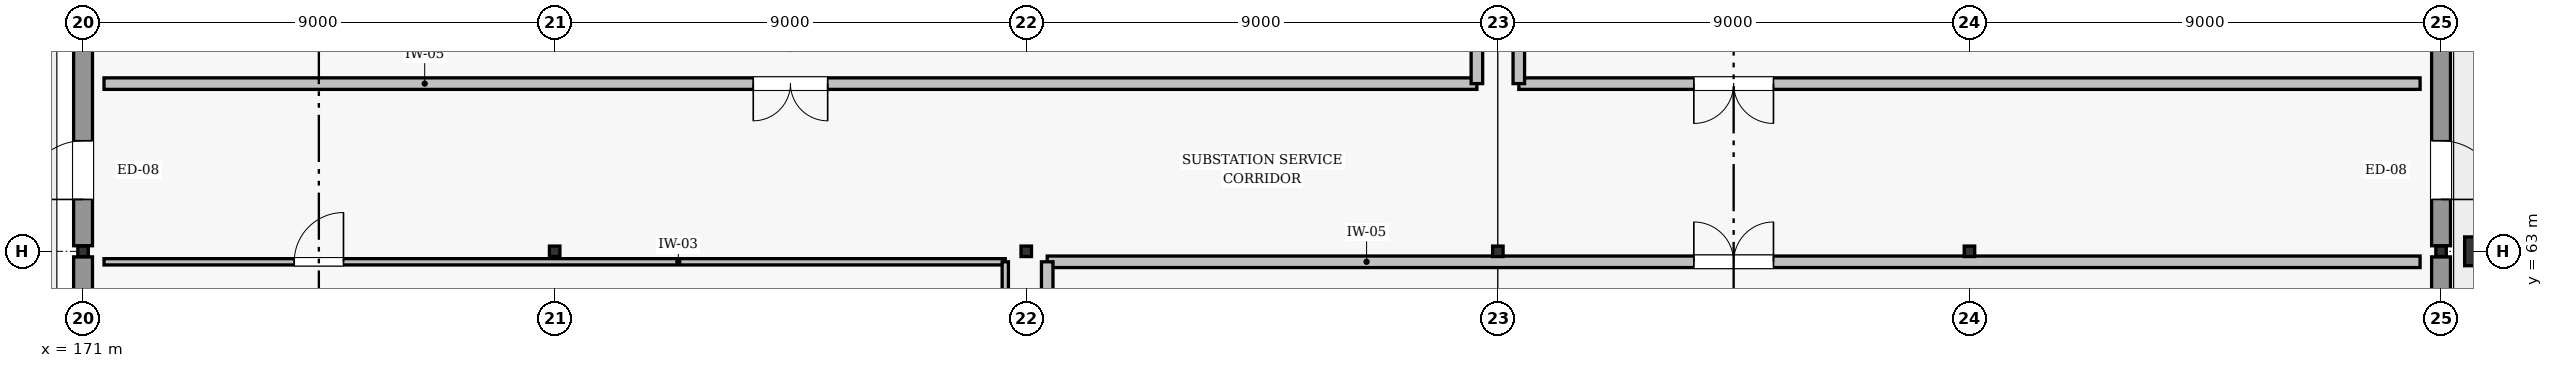
"""IFC4 building model, lengths in metres.
Left out: names, types, materials, properties, quantities, classifications, styles, units other than length and angle.
Written with IfcOpenShell. Run it as: python <this file> out.ifc"""

import sys

from ifc_helpers import new_model, si_unit, direction, frame, frame_2d, origin, origin_2d, place, context, subcontext, project, spatial, rectangle, hollow_rectangle, extrude, element, fill, save


model = new_model("IFC4")
c1 = context("Model", 3, precision=1e-05, world=origin(), true_north=direction((0.0, 1.0)))
c2 = subcontext(c1, "Body", "Model", "MODEL_VIEW")
j1 = project(units=[si_unit("LENGTHUNIT", "METRE"), si_unit("PLANEANGLEUNIT", "RADIAN")], contexts=[c1])
p1 = place(None, origin())
s1 = spatial("IfcSite", under=j1, at=p1, CompositionType="ELEMENT")
p2 = place(p1, origin())
s2 = spatial("IfcBuilding", under=s1, at=p2, CompositionType="ELEMENT")
p3 = place(p2, origin())
s3 = spatial("IfcBuildingStorey", under=s2, at=p3, CompositionType="ELEMENT", Elevation=0.0)
for number, where, z_axis, x_axis in (
    (1, (171.0, 63.0, 0.0), (0.0, 0.0, 1.0), (1.0, 0.0, 0.0)),
    (2, (180.0, 63.0, 0.0), (0.0, 0.0, 1.0), (1.0, 0.0, 0.0)),
    (3, (189.0, 63.0, 0.0), (0.0, 0.0, 1.0), (1.0, 0.0, 0.0)),
    (4, (198.0, 63.0, 0.0), (0.0, 0.0, 1.0), (1.0, 0.0, 0.0)),
    (5, (207.0, 63.0, 0.0), (0.0, 0.0, 1.0), (1.0, 0.0, 0.0)),
    (6, (216.0, 63.0, 0.0), (0.0, 0.0, 1.0), (1.0, 0.0, 0.0)),
):
    element("IfcColumn", number, at=place(p3, frame(where, z_axis=z_axis, x_axis=x_axis)), inside=s3, PredefinedType="COLUMN", context=c2, shape_type="SweptSolid", body=[
        extrude(hollow_rectangle(XDim=0.2, YDim=0.2, WallThickness=0.008, InnerFilletRadius=0.008, OuterFilletRadius=0.016, at=origin_2d()), origin(), (0.0, 0.0, 1.0), 4.8),
    ])
p4 = place(p3, frame((216.85, 63.0, 0.0), z_axis=(0.0, 0.0, 1.0), x_axis=(0.0, 1.0, 0.0)))
e7 = element("IfcColumn", 7, at=p4, inside=s3, PredefinedType="PILASTER", context=c2, shape_type="SweptSolid", body=[
    extrude(rectangle(XDim=0.55, YDim=0.8, at=origin_2d()), origin(), (0.0, 0.0, 1.0), 4.8),
])
p5 = place(p3, frame((171.0, 54.131, 0.0), z_axis=(0.0, 0.0, 1.0), x_axis=(0.0, 1.0, 0.0)))
e8 = element("IfcWall", 8, at=p5, inside=s3, PredefinedType="SOLIDWALL", context=c2, shape_type="SweptSolid", body=[
    extrude(rectangle(XDim=8.763, YDim=0.36, at=frame_2d((4.381, 0.0))), origin(), (0.0, 0.0, 1.0), 4.142),
])
p6 = place(p5, frame((1.801, 0.0, 0.85)))
e9 = element("IfcOpeningElement", 9, at=p6, cuts=e8, PredefinedType="OPENING", context=c2, shape_type="SweptSolid", body=[
    extrude(rectangle(XDim=1.68, YDim=1.66, at=frame_2d((0.84, 0.83))), frame((0.0, 0.19, 0.0), z_axis=(0.0, -1.0, 0.0), x_axis=(1.0, 0.0, 0.0)), (0.0, 0.0, 1.0), 0.38),
])
p7 = place(p5, frame((5.282, 0.0, 0.85)))
e10 = element("IfcOpeningElement", 10, at=p7, cuts=e8, PredefinedType="OPENING", context=c2, shape_type="SweptSolid", body=[
    extrude(rectangle(XDim=1.68, YDim=1.66, at=frame_2d((0.84, 0.83))), frame((0.0, 0.19, 0.0), z_axis=(0.0, -1.0, 0.0), x_axis=(1.0, 0.0, 0.0)), (0.0, 0.0, 1.0), 0.38),
])
p8 = place(p3, frame((171.0, 63.106, 0.0), z_axis=(0.0, 0.0, 1.0), x_axis=(0.0, 1.0, 0.0)))
e11 = element("IfcWall", 11, at=p8, inside=s3, PredefinedType="SOLIDWALL", context=c2, shape_type="SweptSolid", body=[
    extrude(rectangle(XDim=8.798, YDim=0.36, at=frame_2d((4.399, 0.0))), origin(), (0.0, 0.0, 1.0), 4.142),
])
p9 = place(p8, frame((0.884, 0.0, 0.0)))
e12 = element("IfcOpeningElement", 12, at=p9, cuts=e11, PredefinedType="OPENING", context=c2, shape_type="SweptSolid", body=[
    extrude(rectangle(XDim=1.12, YDim=2.14, at=frame_2d((0.56, 1.07))), frame((0.0, 0.19, 0.0), z_axis=(0.0, -1.0, 0.0), x_axis=(1.0, 0.0, 0.0)), (0.0, 0.0, 1.0), 0.38),
])
p10 = place(p3, frame((216.0, 54.131, 0.0), z_axis=(0.0, 0.0, 1.0), x_axis=(0.0, 1.0, 0.0)))
e13 = element("IfcWall", 13, at=p10, inside=s3, PredefinedType="SOLIDWALL", context=c2, shape_type="SweptSolid", body=[
    extrude(rectangle(XDim=8.763, YDim=0.36, at=frame_2d((4.381, 0.0))), origin(), (0.0, 0.0, 1.0), 4.142),
])
p11 = place(p10, frame((2.294, 0.0, 0.85)))
e14 = element("IfcOpeningElement", 14, at=p11, cuts=e13, PredefinedType="OPENING", context=c2, shape_type="SweptSolid", body=[
    extrude(rectangle(XDim=0.94, YDim=1.28, at=frame_2d((0.47, 0.64))), frame((0.0, 0.19, 0.0), z_axis=(0.0, -1.0, 0.0), x_axis=(1.0, 0.0, 0.0)), (0.0, 0.0, 1.0), 0.38),
])
p12 = place(p10, frame((5.529, 0.0, 0.85)))
e15 = element("IfcOpeningElement", 15, at=p12, cuts=e13, PredefinedType="OPENING", context=c2, shape_type="SweptSolid", body=[
    extrude(rectangle(XDim=0.94, YDim=1.28, at=frame_2d((0.47, 0.64))), frame((0.0, 0.19, 0.0), z_axis=(0.0, -1.0, 0.0), x_axis=(1.0, 0.0, 0.0)), (0.0, 0.0, 1.0), 0.38),
])
p13 = place(p3, frame((216.0, 63.106, 0.0), z_axis=(0.0, 0.0, 1.0), x_axis=(0.0, 1.0, 0.0)))
e16 = element("IfcWall", 16, at=p13, inside=s3, PredefinedType="SOLIDWALL", context=c2, shape_type="SweptSolid", body=[
    extrude(rectangle(XDim=8.798, YDim=0.36, at=frame_2d((4.399, 0.0))), origin(), (0.0, 0.0, 1.0), 4.142),
])
p14 = place(p13, frame((0.884, 0.0, 0.0)))
e17 = element("IfcOpeningElement", 17, at=p14, cuts=e16, PredefinedType="OPENING", context=c2, shape_type="SweptSolid", body=[
    extrude(rectangle(XDim=1.12, YDim=2.14, at=frame_2d((0.56, 1.07))), frame((0.0, 0.19, 0.0), z_axis=(0.0, -1.0, 0.0), x_axis=(1.0, 0.0, 0.0)), (0.0, 0.0, 1.0), 0.38),
])
p15 = place(p3, frame((171.4, 62.8, 0.0), z_axis=(0.0, 0.0, 1.0), x_axis=(1.0, 0.0, 0.0)))
e18 = element("IfcWall", 18, at=p15, inside=s3, PredefinedType="PARTITIONING", context=c2, shape_type="SweptSolid", body=[
    extrude(rectangle(XDim=17.2, YDim=0.12, at=frame_2d((8.6, 0.0))), origin(), (0.0, 0.0, 1.0), 4.145),
])
p16 = place(p15, frame((3.63, 0.0, 0.0)))
e19 = element("IfcOpeningElement", 19, at=p16, cuts=e18, PredefinedType="OPENING", context=c2, shape_type="SweptSolid", body=[
    extrude(rectangle(XDim=0.94, YDim=2.06, at=frame_2d((0.47, 1.03))), frame((0.0, 0.07, 0.0), z_axis=(0.0, -1.0, 0.0), x_axis=(1.0, 0.0, 0.0)), (0.0, 0.0, 1.0), 0.14),
])
p17 = place(p3, frame((188.6, 54.4, 0.0), z_axis=(0.0, 0.0, 1.0), x_axis=(0.0, 1.0, 0.0)))
e20 = element("IfcWall", 20, at=p17, inside=s3, PredefinedType="PARTITIONING", context=c2, shape_type="SweptSolid", body=[
    extrude(rectangle(XDim=8.4, YDim=0.12, at=frame_2d((4.2, 0.0))), origin(), (0.0, 0.0, 1.0), 4.55),
])
p18 = place(p3, frame((189.4, 62.8, 0.0), z_axis=(0.0, 0.0, 1.0), x_axis=(1.0, 0.0, 0.0)))
e21 = element("IfcWall", 21, at=p18, inside=s3, PredefinedType="SOLIDWALL", context=c2, shape_type="SweptSolid", body=[
    extrude(rectangle(XDim=26.2, YDim=0.22, at=frame_2d((13.1, 0.0))), origin(), (0.0, 0.0, 1.0), 4.145),
])
p19 = place(p18, frame((12.34, 0.0, 0.0)))
e22 = element("IfcOpeningElement", 22, at=p19, cuts=e21, PredefinedType="OPENING", context=c2, shape_type="SweptSolid", body=[
    extrude(rectangle(XDim=1.52, YDim=2.16, at=frame_2d((0.76, 1.08))), frame((0.0, 0.12, 0.0), z_axis=(0.0, -1.0, 0.0), x_axis=(1.0, 0.0, 0.0)), (0.0, 0.0, 1.0), 0.24),
])
p20 = place(p3, frame((189.4, 54.4, 0.0), z_axis=(0.0, 0.0, 1.0), x_axis=(0.0, 1.0, 0.0)))
e23 = element("IfcWall", 23, at=p20, inside=s3, PredefinedType="SOLIDWALL", context=c2, shape_type="SweptSolid", body=[
    extrude(rectangle(XDim=8.4, YDim=0.22, at=frame_2d((4.2, 0.0))), origin(), (0.0, 0.0, 1.0), 4.55),
])
p21 = place(p3, frame((171.4, 66.2, 0.0), z_axis=(0.0, 0.0, 1.0), x_axis=(1.0, 0.0, 0.0)))
e24 = element("IfcWall", 24, at=p21, inside=s3, PredefinedType="SOLIDWALL", context=c2, shape_type="SweptSolid", body=[
    extrude(rectangle(XDim=26.2, YDim=0.22, at=frame_2d((13.1, 0.0))), origin(), (0.0, 0.0, 1.0), 4.145),
])
p22 = place(p21, frame((12.39, 0.0, 0.0)))
e25 = element("IfcOpeningElement", 25, at=p22, cuts=e24, PredefinedType="OPENING", context=c2, shape_type="SweptSolid", body=[
    extrude(rectangle(XDim=1.42, YDim=2.12, at=frame_2d((0.71, 1.06))), frame((0.0, 0.12, 0.0), z_axis=(0.0, -1.0, 0.0), x_axis=(1.0, 0.0, 0.0)), (0.0, 0.0, 1.0), 0.24),
])
p23 = place(p3, frame((197.6, 66.2, 0.0), z_axis=(0.0, 0.0, 1.0), x_axis=(0.0, 1.0, 0.0)))
e26 = element("IfcWall", 26, at=p23, inside=s3, PredefinedType="SOLIDWALL", context=c2, shape_type="SweptSolid", body=[
    extrude(rectangle(XDim=14.4, YDim=0.22, at=frame_2d((7.2, 0.0))), origin(), (0.0, 0.0, 1.0), 4.55),
])
p24 = place(p3, frame((198.4, 66.2, 0.0), z_axis=(0.0, 0.0, 1.0), x_axis=(1.0, 0.0, 0.0)))
e27 = element("IfcWall", 27, at=p24, inside=s3, PredefinedType="SOLIDWALL", context=c2, shape_type="SweptSolid", body=[
    extrude(rectangle(XDim=17.2, YDim=0.22, at=frame_2d((8.6, 0.0))), origin(), (0.0, 0.0, 1.0), 4.145),
])
p25 = place(p24, frame((3.34, 0.0, 0.0)))
e28 = element("IfcOpeningElement", 28, at=p25, cuts=e27, PredefinedType="OPENING", context=c2, shape_type="SweptSolid", body=[
    extrude(rectangle(XDim=1.52, YDim=2.16, at=frame_2d((0.76, 1.08))), frame((0.0, 0.12, 0.0), z_axis=(0.0, -1.0, 0.0), x_axis=(1.0, 0.0, 0.0)), (0.0, 0.0, 1.0), 0.24),
])
p26 = place(p3, frame((198.4, 66.2, 0.0), z_axis=(0.0, 0.0, 1.0), x_axis=(0.0, 1.0, 0.0)))
e29 = element("IfcWall", 29, at=p26, inside=s3, PredefinedType="SOLIDWALL", context=c2, shape_type="SweptSolid", body=[
    extrude(rectangle(XDim=14.4, YDim=0.22, at=frame_2d((7.2, 0.0))), origin(), (0.0, 0.0, 1.0), 4.55),
])
p27 = place(p9, origin())
e30 = element("IfcDoor", 30, at=p27, inside=s3, OperationType="SINGLE_SWING_LEFT", PredefinedType="DOOR", context=c2, shape_type="SweptSolid", body=[
    extrude(rectangle(XDim=1.12, YDim=2.14, at=frame_2d((0.56, 1.07))), frame((0.0, 0.025, 0.0), z_axis=(0.0, -1.0, 0.0), x_axis=(1.0, 0.0, 0.0)), (0.0, 0.0, 1.0), 0.05),
])
fill(e12, e30)
p28 = place(p14, frame((1.12, 0.0, 0.0), z_axis=(0.0, 0.0, 1.0), x_axis=(-1.0, 0.0, 0.0)))
e31 = element("IfcDoor", 31, at=p28, inside=s3, OperationType="SINGLE_SWING_LEFT", PredefinedType="DOOR", context=c2, shape_type="SweptSolid", body=[
    extrude(rectangle(XDim=1.12, YDim=2.14, at=frame_2d((0.56, 1.07))), frame((0.0, 0.025, 0.0), z_axis=(0.0, -1.0, 0.0), x_axis=(1.0, 0.0, 0.0)), (0.0, 0.0, 1.0), 0.05),
])
fill(e17, e31)
p29 = place(p16, origin())
e32 = element("IfcDoor", 32, at=p29, inside=s3, OperationType="SINGLE_SWING_RIGHT", PredefinedType="DOOR", context=c2, shape_type="SweptSolid", body=[
    extrude(rectangle(XDim=0.94, YDim=2.06, at=frame_2d((0.47, 1.03))), frame((0.0, 0.025, 0.0), z_axis=(0.0, -1.0, 0.0), x_axis=(1.0, 0.0, 0.0)), (0.0, 0.0, 1.0), 0.05),
])
fill(e19, e32)
p30 = place(p19, origin())
e33 = element("IfcDoor", 33, at=p30, inside=s3, OperationType="DOUBLE_SWING_LEFT", PredefinedType="DOOR", context=c2, shape_type="SweptSolid", body=[
    extrude(rectangle(XDim=1.52, YDim=2.16, at=frame_2d((0.76, 1.08))), frame((0.0, 0.025, 0.0), z_axis=(0.0, -1.0, 0.0), x_axis=(1.0, 0.0, 0.0)), (0.0, 0.0, 1.0), 0.05),
])
fill(e22, e33)
p31 = place(p22, frame((1.42, 0.0, 0.0), z_axis=(0.0, 0.0, 1.0), x_axis=(-1.0, 0.0, 0.0)))
e34 = element("IfcDoor", 34, at=p31, inside=s3, OperationType="DOUBLE_SWING_LEFT", PredefinedType="DOOR", context=c2, shape_type="SweptSolid", body=[
    extrude(rectangle(XDim=1.42, YDim=2.12, at=frame_2d((0.71, 1.06))), frame((0.0, 0.025, 0.0), z_axis=(0.0, -1.0, 0.0), x_axis=(1.0, 0.0, 0.0)), (0.0, 0.0, 1.0), 0.05),
])
fill(e25, e34)
p32 = place(p25, frame((1.52, 0.0, 0.0), z_axis=(0.0, 0.0, 1.0), x_axis=(-1.0, 0.0, 0.0)))
e35 = element("IfcDoor", 35, at=p32, inside=s3, OperationType="DOUBLE_SWING_LEFT", PredefinedType="DOOR", context=c2, shape_type="SweptSolid", body=[
    extrude(rectangle(XDim=1.52, YDim=2.16, at=frame_2d((0.76, 1.08))), frame((0.0, 0.025, 0.0), z_axis=(0.0, -1.0, 0.0), x_axis=(1.0, 0.0, 0.0)), (0.0, 0.0, 1.0), 0.05),
])
fill(e28, e35)
save(model, sys.argv[1])
